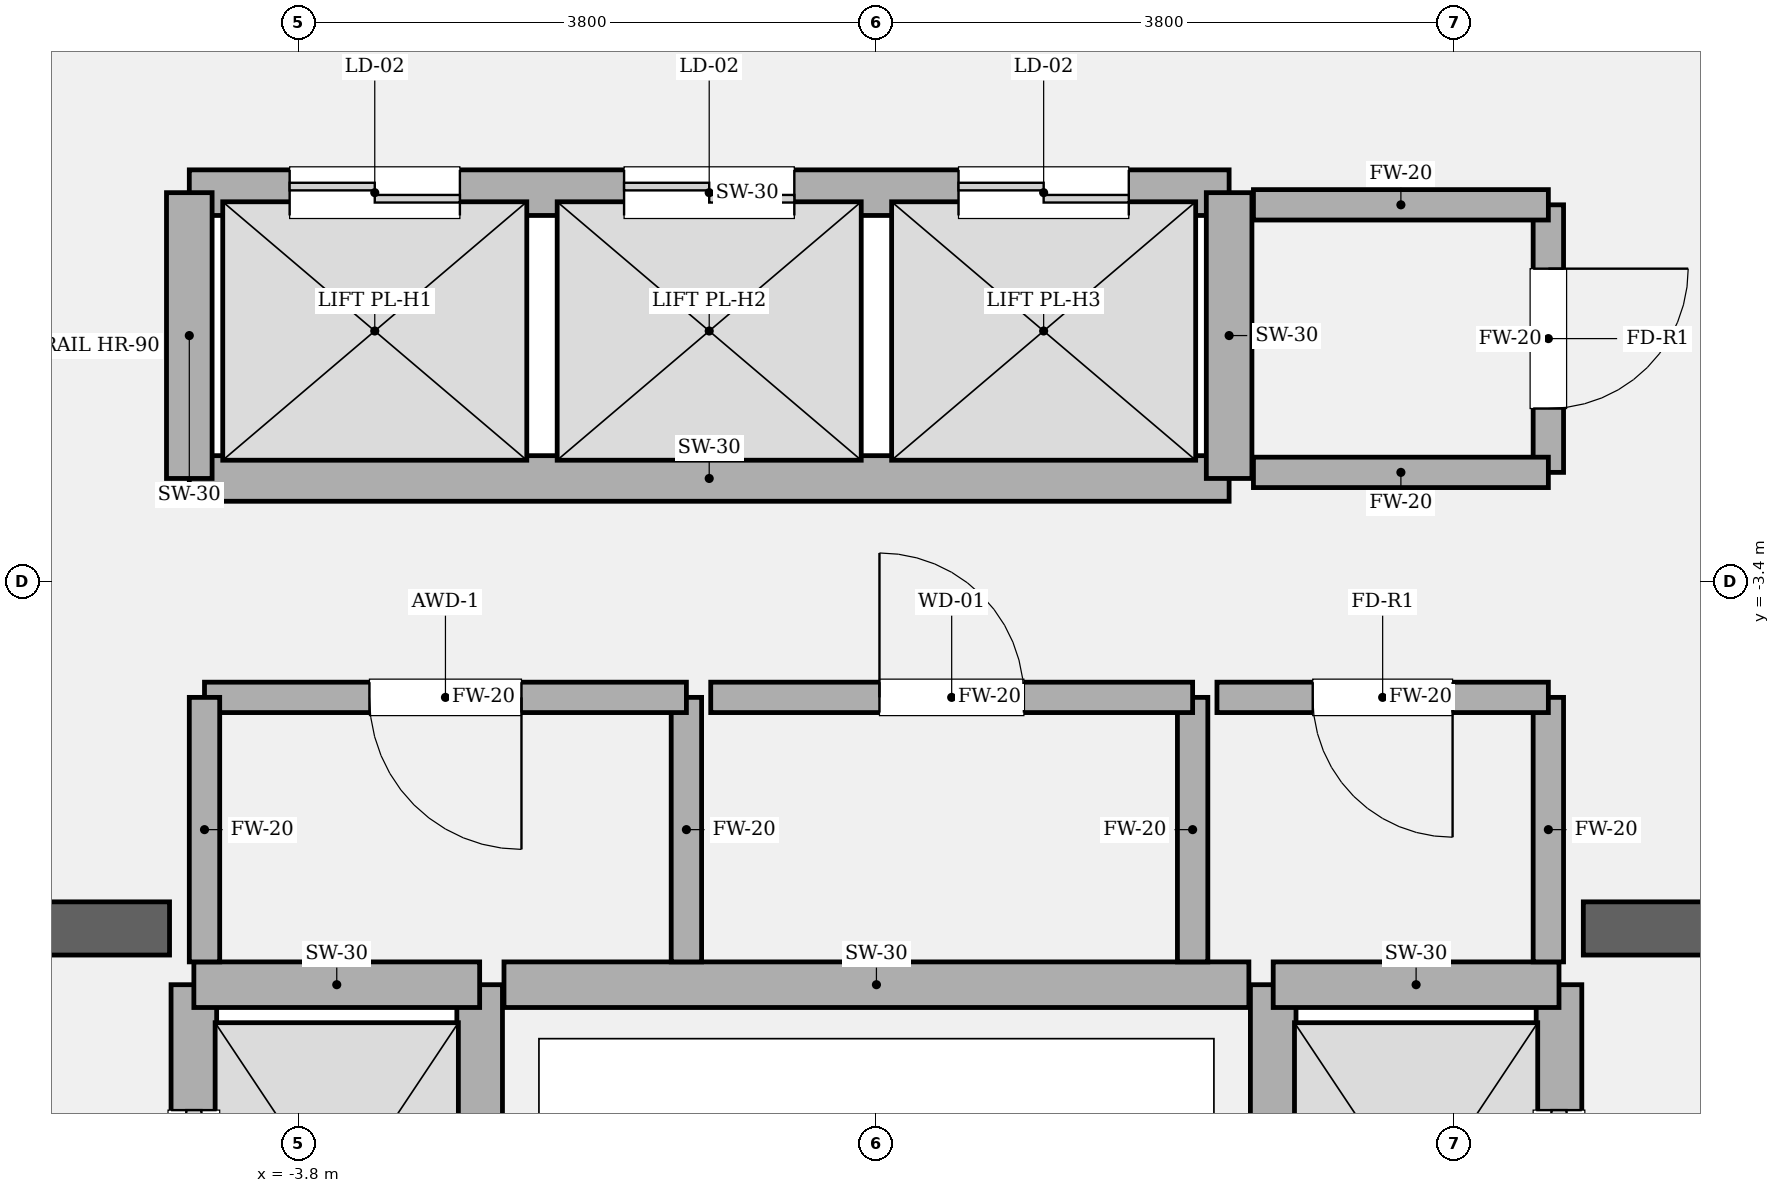
"""IFC4 building model, lengths in metres.
Left out: names, types, materials, properties, quantities, classifications, styles, units other than length and angle.
Written with IfcOpenShell. Run it as: python <this file> out.ifc"""

import sys

from ifc_helpers import new_model, si_unit, direction, frame, frame_2d, origin, place, context, subcontext, project, spatial, rectangle, extrude, element, fill, save


model = new_model("IFC4")
c1 = context("Model", 3, precision=1e-05, world=origin(), true_north=direction((0.0, 1.0)))
c2 = subcontext(c1, "Body", "Model", "MODEL_VIEW")
j1 = project(units=[si_unit("LENGTHUNIT", "METRE"), si_unit("PLANEANGLEUNIT", "RADIAN")], contexts=[c1])
p1 = place(None, origin())
s1 = spatial("IfcSite", under=j1, at=p1, CompositionType="ELEMENT")
p2 = place(p1, origin())
s2 = spatial("IfcBuilding", under=s1, at=p2, CompositionType="ELEMENT")
p3 = place(p2, frame((0.0, 0.0, 275.7)))
s3 = spatial("IfcBuildingStorey", under=s2, at=p3, CompositionType="ELEMENT", Elevation=275.7)
p4 = place(p3, frame((-9.925, -5.68, 0.0), z_axis=(0.0, 0.0, 1.0), x_axis=(1.0, 0.0, 0.0)))
e1 = element("IfcWall", 1, at=p4, inside=s3, PredefinedType="SOLIDWALL", context=c2, shape_type="SweptSolid", body=[
    extrude(rectangle(XDim=5.275, YDim=0.35, at=frame_2d((2.638, 0.0))), origin(), (0.0, 0.0, 1.0), 4.05),
])
p5 = place(p4, frame((1.385, 0.0, 0.0)))
e2 = element("IfcOpeningElement", 2, at=p5, cuts=e1, PredefinedType="OPENING", context=c2, shape_type="SweptSolid", body=[
    extrude(rectangle(XDim=1.18, YDim=2.2, at=frame_2d((0.59, 1.1))), frame((0.0, 0.185, 0.0), z_axis=(0.0, -1.0, 0.0), x_axis=(1.0, 0.0, 0.0)), (0.0, 0.0, 1.0), 0.37),
])
p6 = place(p3, frame((4.65, -5.68, 0.0), z_axis=(0.0, 0.0, 1.0), x_axis=(1.0, 0.0, 0.0)))
e3 = element("IfcWall", 3, at=p6, inside=s3, PredefinedType="SOLIDWALL", context=c2, shape_type="SweptSolid", body=[
    extrude(rectangle(XDim=5.275, YDim=0.35, at=frame_2d((2.638, 0.0))), origin(), (0.0, 0.0, 1.0), 4.05),
])
p7 = place(p6, frame((2.71, 0.0, 0.0)))
e4 = element("IfcOpeningElement", 4, at=p7, cuts=e3, PredefinedType="OPENING", context=c2, shape_type="SweptSolid", body=[
    extrude(rectangle(XDim=1.18, YDim=2.2, at=frame_2d((0.59, 1.1))), frame((0.0, 0.185, 0.0), z_axis=(0.0, -1.0, 0.0), x_axis=(1.0, 0.0, 0.0)), (0.0, 0.0, 1.0), 0.37),
])
p8 = place(p3, frame((-4.49, -8.82, 0.0), z_axis=(0.0, 0.0, 1.0), x_axis=(0.0, 1.0, 0.0)))
e5 = element("IfcWall", 5, at=p8, inside=s3, PredefinedType="SOLIDWALL", context=c2, shape_type="SweptSolid", body=[
    extrude(rectangle(XDim=2.77, YDim=0.3, at=frame_2d((1.385, 0.0))), origin(), (0.0, 0.0, 1.0), 3.85),
])
p9 = place(p8, frame((0.825, 0.0, 0.0)))
e6 = element("IfcOpeningElement", 6, at=p9, cuts=e5, PredefinedType="OPENING", context=c2, shape_type="SweptSolid", body=[
    extrude(rectangle(XDim=1.12, YDim=2.25, at=frame_2d((0.56, 1.125))), frame((0.0, 0.16, 0.0), z_axis=(0.0, -1.0, 0.0), x_axis=(1.0, 0.0, 0.0)), (0.0, 0.0, 1.0), 0.32),
])
p10 = place(p3, frame((-2.61, -8.82, 0.0), z_axis=(0.0, 0.0, 1.0), x_axis=(0.0, 1.0, 0.0)))
e7 = element("IfcWall", 7, at=p10, inside=s3, PredefinedType="SOLIDWALL", context=c2, shape_type="SweptSolid", body=[
    extrude(rectangle(XDim=2.77, YDim=0.3, at=frame_2d((1.385, 0.0))), origin(), (0.0, 0.0, 1.0), 3.85),
])
p11 = place(p3, frame((-4.49, -6.05, 0.0), z_axis=(0.0, 0.0, 1.0), x_axis=(1.0, 0.0, 0.0)))
e8 = element("IfcWall", 8, at=p11, inside=s3, PredefinedType="SOLIDWALL", context=c2, shape_type="SweptSolid", body=[
    extrude(rectangle(XDim=1.88, YDim=0.3, at=frame_2d((0.94, 0.0))), origin(), (0.0, 0.0, 1.0), 3.85),
])
p12 = place(p3, frame((4.49, -8.82, 0.0), z_axis=(0.0, 0.0, 1.0), x_axis=(0.0, 1.0, 0.0)))
e9 = element("IfcWall", 9, at=p12, inside=s3, PredefinedType="SOLIDWALL", context=c2, shape_type="SweptSolid", body=[
    extrude(rectangle(XDim=2.77, YDim=0.3, at=frame_2d((1.385, 0.0))), origin(), (0.0, 0.0, 1.0), 3.85),
])
p13 = place(p12, frame((0.825, 0.0, 0.0)))
e10 = element("IfcOpeningElement", 10, at=p13, cuts=e9, PredefinedType="OPENING", context=c2, shape_type="SweptSolid", body=[
    extrude(rectangle(XDim=1.12, YDim=2.25, at=frame_2d((0.56, 1.125))), frame((0.0, 0.16, 0.0), z_axis=(0.0, -1.0, 0.0), x_axis=(1.0, 0.0, 0.0)), (0.0, 0.0, 1.0), 0.32),
])
p14 = place(p3, frame((2.61, -8.82, 0.0), z_axis=(0.0, 0.0, 1.0), x_axis=(0.0, 1.0, 0.0)))
e11 = element("IfcWall", 11, at=p14, inside=s3, PredefinedType="SOLIDWALL", context=c2, shape_type="SweptSolid", body=[
    extrude(rectangle(XDim=2.77, YDim=0.3, at=frame_2d((1.385, 0.0))), origin(), (0.0, 0.0, 1.0), 3.85),
])
p15 = place(p3, frame((2.61, -6.05, 0.0), z_axis=(0.0, 0.0, 1.0), x_axis=(1.0, 0.0, 0.0)))
e12 = element("IfcWall", 12, at=p15, inside=s3, PredefinedType="SOLIDWALL", context=c2, shape_type="SweptSolid", body=[
    extrude(rectangle(XDim=1.88, YDim=0.3, at=frame_2d((0.94, 0.0))), origin(), (0.0, 0.0, 1.0), 3.85),
])
p16 = place(p3, frame((-4.52, -0.84, 0.0), z_axis=(0.0, 0.0, 1.0), x_axis=(1.0, 0.0, 0.0)))
e13 = element("IfcWall", 13, at=p16, inside=s3, PredefinedType="SOLIDWALL", context=c2, shape_type="SweptSolid", body=[
    extrude(rectangle(XDim=6.84, YDim=0.3, at=frame_2d((3.42, 0.0))), origin(), (0.0, 0.0, 1.0), 3.85),
])
p17 = place(p16, frame((0.66, 0.0, 0.0)))
e14 = element("IfcOpeningElement", 14, at=p17, cuts=e13, PredefinedType="OPENING", context=c2, shape_type="SweptSolid", body=[
    extrude(rectangle(XDim=1.12, YDim=2.25, at=frame_2d((0.56, 1.125))), frame((0.0, 0.16, 0.0), z_axis=(0.0, -1.0, 0.0), x_axis=(1.0, 0.0, 0.0)), (0.0, 0.0, 1.0), 0.32),
])
p18 = place(p16, frame((2.86, 0.0, 0.0)))
e15 = element("IfcOpeningElement", 15, at=p18, cuts=e13, PredefinedType="OPENING", context=c2, shape_type="SweptSolid", body=[
    extrude(rectangle(XDim=1.12, YDim=2.25, at=frame_2d((0.56, 1.125))), frame((0.0, 0.16, 0.0), z_axis=(0.0, -1.0, 0.0), x_axis=(1.0, 0.0, 0.0)), (0.0, 0.0, 1.0), 0.32),
])
p19 = place(p16, frame((5.06, 0.0, 0.0)))
e16 = element("IfcOpeningElement", 16, at=p19, cuts=e13, PredefinedType="OPENING", context=c2, shape_type="SweptSolid", body=[
    extrude(rectangle(XDim=1.12, YDim=2.25, at=frame_2d((0.56, 1.125))), frame((0.0, 0.16, 0.0), z_axis=(0.0, -1.0, 0.0), x_axis=(1.0, 0.0, 0.0)), (0.0, 0.0, 1.0), 0.32),
])
p20 = place(p3, frame((-4.52, -2.72, 0.0), z_axis=(0.0, 0.0, 1.0), x_axis=(1.0, 0.0, 0.0)))
e17 = element("IfcWall", 17, at=p20, inside=s3, PredefinedType="SOLIDWALL", context=c2, shape_type="SweptSolid", body=[
    extrude(rectangle(XDim=6.84, YDim=0.3, at=frame_2d((3.42, 0.0))), origin(), (0.0, 0.0, 1.0), 3.85),
])
for number, where, z_axis, x_axis in (
    (18, (-4.52, -2.72, 0.0), (0.0, 0.0, 1.0), (0.0, 1.0, 0.0)),
    (19, (2.32, -2.72, 0.0), (0.0, 0.0, 1.0), (0.0, 1.0, 0.0)),
):
    element("IfcWall", number, at=place(p3, frame(where, z_axis=z_axis, x_axis=x_axis)), inside=s3, PredefinedType="SOLIDWALL", context=c2, shape_type="SweptSolid", body=[
        extrude(rectangle(XDim=1.88, YDim=0.3, at=frame_2d((0.94, 0.0))), origin(), (0.0, 0.0, 1.0), 3.85),
    ])
p21 = place(p3, frame((-2.45, -6.05, 0.0), z_axis=(0.0, 0.0, 1.0), x_axis=(1.0, 0.0, 0.0)))
e20 = element("IfcWall", 20, at=p21, inside=s3, PredefinedType="SOLIDWALL", context=c2, shape_type="SweptSolid", body=[
    extrude(rectangle(XDim=4.9, YDim=0.3, at=frame_2d((2.45, 0.0))), origin(), (0.0, 0.0, 1.0), 3.85),
])
p22 = place(p3, frame((-1.25, -5.9, 0.0), z_axis=(0.0, 0.0, 1.0), x_axis=(0.0, 1.0, 0.0)))
e21 = element("IfcWall", 21, at=p22, inside=s3, PredefinedType="SOLIDWALL", context=c2, shape_type="SweptSolid", body=[
    extrude(rectangle(XDim=1.74, YDim=0.2, at=frame_2d((0.87, 0.0))), origin(), (0.0, 0.0, 1.0), 3.85),
])
p23 = place(p3, frame((-1.25, -4.16, 0.0), z_axis=(0.0, 0.0, 1.0), x_axis=(-1.0, 0.0, 0.0)))
e22 = element("IfcWall", 22, at=p23, inside=s3, PredefinedType="SOLIDWALL", context=c2, shape_type="SweptSolid", body=[
    extrude(rectangle(XDim=3.17, YDim=0.2, at=frame_2d((1.585, 0.0))), origin(), (0.0, 0.0, 1.0), 3.85),
])
p24 = place(p23, frame((1.085, 0.0, 0.0)))
e23 = element("IfcOpeningElement", 23, at=p24, cuts=e22, PredefinedType="OPENING", context=c2, shape_type="SweptSolid", body=[
    extrude(rectangle(XDim=1.0, YDim=2.15, at=frame_2d((0.5, 1.075))), frame((0.0, 0.11, 0.0), z_axis=(0.0, -1.0, 0.0), x_axis=(1.0, 0.0, 0.0)), (0.0, 0.0, 1.0), 0.22),
])
for number, where, z_axis, x_axis in (
    (24, (-4.42, -4.16, 0.0), (0.0, 0.0, 1.0), (0.0, -1.0, 0.0)),
    (25, (2.08, -5.9, 0.0), (0.0, 0.0, 1.0), (0.0, 1.0, 0.0)),
):
    element("IfcWall", number, at=place(p3, frame(where, z_axis=z_axis, x_axis=x_axis)), inside=s3, PredefinedType="SOLIDWALL", context=c2, shape_type="SweptSolid", body=[
        extrude(rectangle(XDim=1.74, YDim=0.2, at=frame_2d((0.87, 0.0))), origin(), (0.0, 0.0, 1.0), 3.85),
    ])
p25 = place(p3, frame((2.08, -4.16, 0.0), z_axis=(0.0, 0.0, 1.0), x_axis=(-1.0, 0.0, 0.0)))
e26 = element("IfcWall", 26, at=p25, inside=s3, PredefinedType="SOLIDWALL", context=c2, shape_type="SweptSolid", body=[
    extrude(rectangle(XDim=3.17, YDim=0.2, at=frame_2d((1.585, 0.0))), origin(), (0.0, 0.0, 1.0), 3.85),
])
p26 = place(p25, frame((1.11, 0.0, 0.0)))
e27 = element("IfcOpeningElement", 27, at=p26, cuts=e26, PredefinedType="OPENING", context=c2, shape_type="SweptSolid", body=[
    extrude(rectangle(XDim=0.95, YDim=2.15, at=frame_2d((0.475, 1.075))), frame((0.0, 0.11, 0.0), z_axis=(0.0, -1.0, 0.0), x_axis=(1.0, 0.0, 0.0)), (0.0, 0.0, 1.0), 0.22),
])
p27 = place(p3, frame((4.42, -5.9, 0.0), z_axis=(0.0, 0.0, 1.0), x_axis=(0.0, 1.0, 0.0)))
e28 = element("IfcWall", 28, at=p27, inside=s3, PredefinedType="SOLIDWALL", context=c2, shape_type="SweptSolid", body=[
    extrude(rectangle(XDim=1.74, YDim=0.2, at=frame_2d((0.87, 0.0))), origin(), (0.0, 0.0, 1.0), 3.85),
])
p28 = place(p3, frame((4.42, -4.16, 0.0), z_axis=(0.0, 0.0, 1.0), x_axis=(-1.0, 0.0, 0.0)))
e29 = element("IfcWall", 29, at=p28, inside=s3, PredefinedType="SOLIDWALL", context=c2, shape_type="SweptSolid", body=[
    extrude(rectangle(XDim=2.18, YDim=0.2, at=frame_2d((1.09, 0.0))), origin(), (0.0, 0.0, 1.0), 3.85),
])
p29 = place(p28, frame((0.63, 0.0, 0.0)))
e30 = element("IfcOpeningElement", 30, at=p29, cuts=e29, PredefinedType="OPENING", context=c2, shape_type="SweptSolid", body=[
    extrude(rectangle(XDim=0.92, YDim=2.1, at=frame_2d((0.46, 1.05))), frame((0.0, 0.11, 0.0), z_axis=(0.0, -1.0, 0.0), x_axis=(1.0, 0.0, 0.0)), (0.0, 0.0, 1.0), 0.22),
])
p30 = place(p3, frame((4.42, -2.68, 0.0), z_axis=(0.0, 0.0, 1.0), x_axis=(0.0, 1.0, 0.0)))
e31 = element("IfcWall", 31, at=p30, inside=s3, PredefinedType="SOLIDWALL", context=c2, shape_type="SweptSolid", body=[
    extrude(rectangle(XDim=1.76, YDim=0.2, at=frame_2d((0.88, 0.0))), origin(), (0.0, 0.0, 1.0), 3.85),
])
p31 = place(p30, frame((0.42, 0.0, 0.0)))
e32 = element("IfcOpeningElement", 32, at=p31, cuts=e31, PredefinedType="OPENING", context=c2, shape_type="SweptSolid", body=[
    extrude(rectangle(XDim=0.92, YDim=2.1, at=frame_2d((0.46, 1.05))), frame((0.0, 0.11, 0.0), z_axis=(0.0, -1.0, 0.0), x_axis=(1.0, 0.0, 0.0)), (0.0, 0.0, 1.0), 0.22),
])
for number, where, z_axis, x_axis in (
    (33, (4.42, -0.92, 0.0), (0.0, 0.0, 1.0), (-1.0, 0.0, 0.0)),
    (34, (2.48, -2.68, 0.0), (0.0, 0.0, 1.0), (1.0, 0.0, 0.0)),
):
    element("IfcWall", number, at=place(p3, frame(where, z_axis=z_axis, x_axis=x_axis)), inside=s3, PredefinedType="SOLIDWALL", context=c2, shape_type="SweptSolid", body=[
        extrude(rectangle(XDim=1.94, YDim=0.2, at=frame_2d((0.97, 0.0))), origin(), (0.0, 0.0, 1.0), 3.85),
    ])
p32 = place(p9, origin())
e35 = element("IfcDoor", 35, at=p32, inside=s3, OperationType="SLIDING_TO_LEFT", PredefinedType="DOOR", context=c2, shape_type="SweptSolid", body=[
    extrude(rectangle(XDim=1.12, YDim=2.25, at=frame_2d((0.56, 1.125))), frame((0.0, 0.025, 0.0), z_axis=(0.0, -1.0, 0.0), x_axis=(1.0, 0.0, 0.0)), (0.0, 0.0, 1.0), 0.05),
])
fill(e6, e35)
p33 = place(p13, origin())
e36 = element("IfcDoor", 36, at=p33, inside=s3, OperationType="SLIDING_TO_RIGHT", PredefinedType="DOOR", context=c2, shape_type="SweptSolid", body=[
    extrude(rectangle(XDim=1.12, YDim=2.25, at=frame_2d((0.56, 1.125))), frame((0.0, 0.025, 0.0), z_axis=(0.0, -1.0, 0.0), x_axis=(1.0, 0.0, 0.0)), (0.0, 0.0, 1.0), 0.05),
])
fill(e10, e36)
p34 = place(p17, origin())
e37 = element("IfcDoor", 37, at=p34, inside=s3, OperationType="DOUBLE_DOOR_SLIDING", PredefinedType="DOOR", context=c2, shape_type="SweptSolid", body=[
    extrude(rectangle(XDim=1.12, YDim=2.25, at=frame_2d((0.56, 1.125))), frame((0.0, 0.025, 0.0), z_axis=(0.0, -1.0, 0.0), x_axis=(1.0, 0.0, 0.0)), (0.0, 0.0, 1.0), 0.05),
])
fill(e14, e37)
p35 = place(p18, origin())
e38 = element("IfcDoor", 38, at=p35, inside=s3, OperationType="DOUBLE_DOOR_SLIDING", PredefinedType="DOOR", context=c2, shape_type="SweptSolid", body=[
    extrude(rectangle(XDim=1.12, YDim=2.25, at=frame_2d((0.56, 1.125))), frame((0.0, 0.025, 0.0), z_axis=(0.0, -1.0, 0.0), x_axis=(1.0, 0.0, 0.0)), (0.0, 0.0, 1.0), 0.05),
])
fill(e15, e38)
p36 = place(p19, origin())
e39 = element("IfcDoor", 39, at=p36, inside=s3, OperationType="DOUBLE_DOOR_SLIDING", PredefinedType="DOOR", context=c2, shape_type="SweptSolid", body=[
    extrude(rectangle(XDim=1.12, YDim=2.25, at=frame_2d((0.56, 1.125))), frame((0.0, 0.025, 0.0), z_axis=(0.0, -1.0, 0.0), x_axis=(1.0, 0.0, 0.0)), (0.0, 0.0, 1.0), 0.05),
])
fill(e16, e39)
p37 = place(p24, origin())
e40 = element("IfcDoor", 40, at=p37, inside=s3, OperationType="SINGLE_SWING_LEFT", PredefinedType="DOOR", context=c2, shape_type="SweptSolid", body=[
    extrude(rectangle(XDim=1.0, YDim=2.15, at=frame_2d((0.5, 1.075))), frame((0.0, 0.025, 0.0), z_axis=(0.0, -1.0, 0.0), x_axis=(1.0, 0.0, 0.0)), (0.0, 0.0, 1.0), 0.05),
])
fill(e23, e40)
p38 = place(p26, origin())
e41 = element("IfcDoor", 41, at=p38, inside=s3, OperationType="SINGLE_SWING_RIGHT", PredefinedType="DOOR", context=c2, shape_type="SweptSolid", body=[
    extrude(rectangle(XDim=0.95, YDim=2.15, at=frame_2d((0.475, 1.075))), frame((0.0, 0.025, 0.0), z_axis=(0.0, -1.0, 0.0), x_axis=(1.0, 0.0, 0.0)), (0.0, 0.0, 1.0), 0.05),
])
fill(e27, e41)
p39 = place(p29, origin())
e42 = element("IfcDoor", 42, at=p39, inside=s3, OperationType="SINGLE_SWING_LEFT", PredefinedType="DOOR", context=c2, shape_type="SweptSolid", body=[
    extrude(rectangle(XDim=0.92, YDim=2.1, at=frame_2d((0.46, 1.05))), frame((0.0, 0.025, 0.0), z_axis=(0.0, -1.0, 0.0), x_axis=(1.0, 0.0, 0.0)), (0.0, 0.0, 1.0), 0.05),
])
fill(e30, e42)
p40 = place(p31, origin())
e43 = element("IfcDoor", 43, at=p40, inside=s3, OperationType="SINGLE_SWING_RIGHT", PredefinedType="DOOR", context=c2, shape_type="SweptSolid", body=[
    extrude(rectangle(XDim=0.92, YDim=2.1, at=frame_2d((0.46, 1.05))), frame((0.0, 0.025, 0.0), z_axis=(0.0, -1.0, 0.0), x_axis=(1.0, 0.0, 0.0)), (0.0, 0.0, 1.0), 0.05),
])
fill(e32, e43)
save(model, sys.argv[1])
